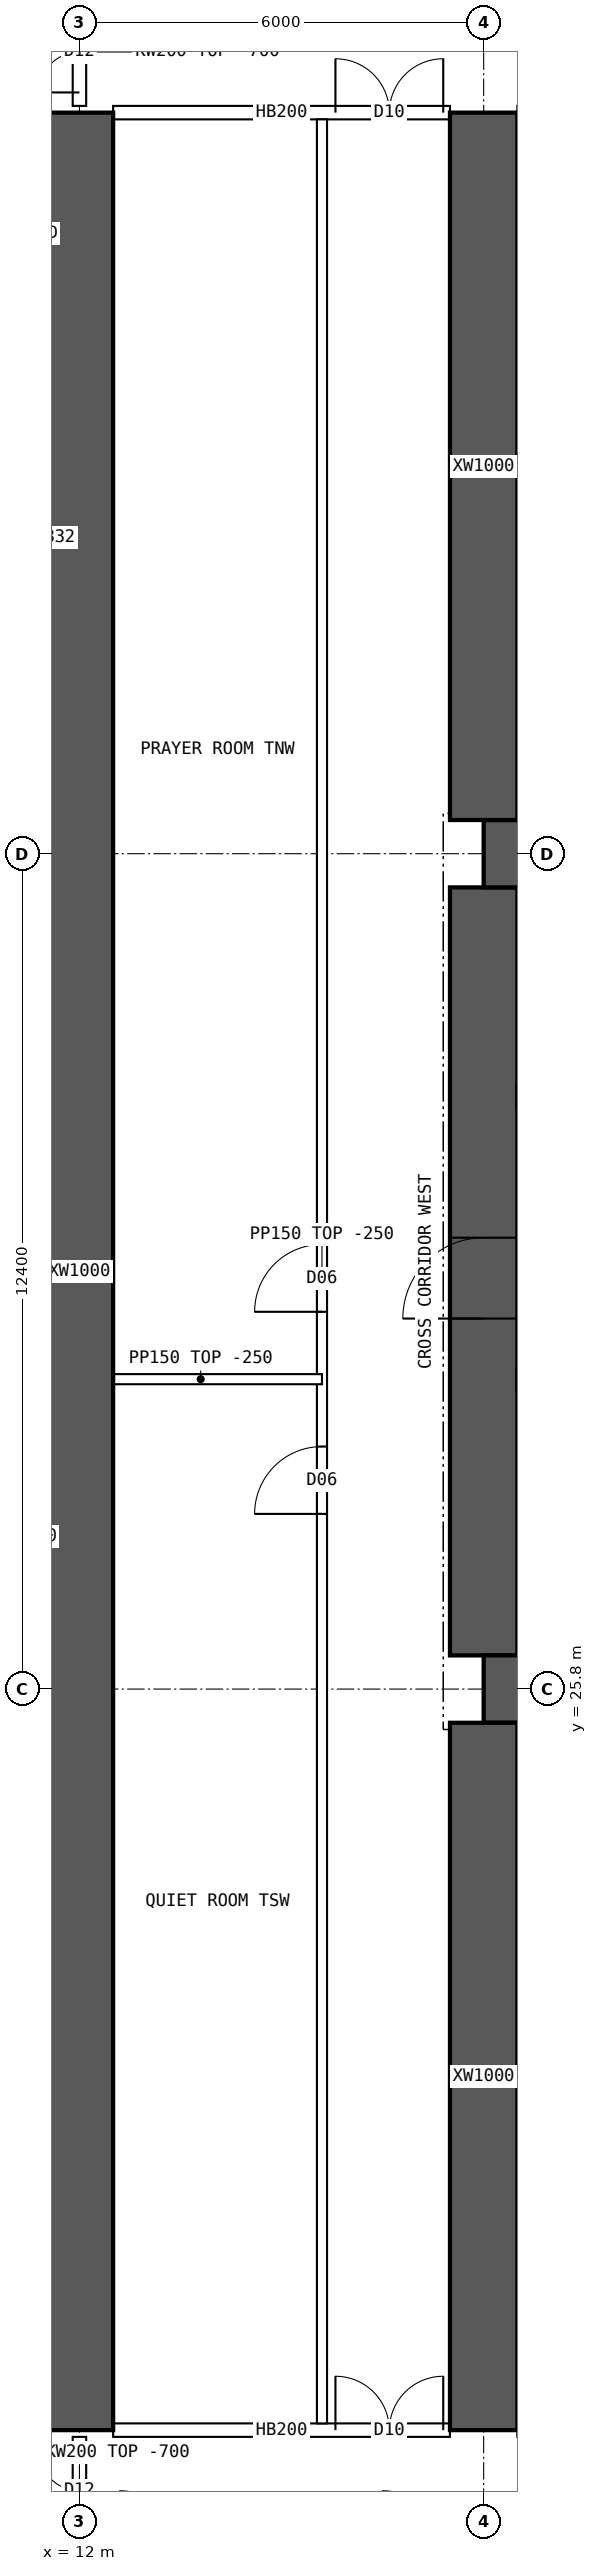
"""IFC4 building model, lengths in metres.
Left out: names, types, materials, properties, quantities, classifications, styles, units other than length and angle.
Written with IfcOpenShell. Run it as: python <this file> out.ifc"""

import sys

from ifc_helpers import new_model, si_unit, direction, frame, frame_2d, origin, place, context, subcontext, project, spatial, polyline, rectangle, outline, extrude, element, fill, save


model = new_model("IFC4")
c1 = context("Model", 3, precision=1e-05, world=origin(), true_north=direction((0.0, 1.0)))
c2 = subcontext(c1, "Body", "Model", "MODEL_VIEW")
j1 = project(units=[si_unit("LENGTHUNIT", "METRE"), si_unit("PLANEANGLEUNIT", "RADIAN")], contexts=[c1])
p1 = place(None, origin())
s1 = spatial("IfcSite", under=j1, at=p1, CompositionType="ELEMENT")
p2 = place(p1, origin())
s2 = spatial("IfcBuilding", under=s1, at=p2, CompositionType="ELEMENT")
p3 = place(p2, frame((0.0, 0.0, 38.95)))
s3 = spatial("IfcBuildingStorey", under=s2, at=p3, CompositionType="ELEMENT", Elevation=38.95)
for number, where, z_axis, x_axis in (
    (1, (18.0, 25.8, 0.0), (0.0, 0.0, 1.0), (1.0, 0.0, 0.0)),
    (2, (18.0, 38.2, 0.0), (0.0, 0.0, 1.0), (1.0, 0.0, 0.0)),
):
    element("IfcWall", number, at=place(p3, frame(where, z_axis=z_axis, x_axis=x_axis)), inside=s3, PredefinedType="SHEAR", context=c2, shape_type="SweptSolid", body=[
        extrude(rectangle(XDim=48.0, YDim=1.0, at=frame_2d((24.0, 0.0))), origin(), (0.0, 0.0, 1.0), 3.75),
    ])
p4 = place(p3, frame((18.0, 26.3, 0.0), z_axis=(0.0, 0.0, 1.0), x_axis=(0.0, 1.0, 0.0)))
e3 = element("IfcWall", 3, at=p4, inside=s3, PredefinedType="SHEAR", context=c2, shape_type="SweptSolid", body=[
    extrude(rectangle(XDim=11.4, YDim=1.0, at=frame_2d((5.7, 0.0))), origin(), (0.0, 0.0, 1.0), 3.75),
])
p5 = place(p4, frame((5.0, 0.0, 0.0)))
e4 = element("IfcOpeningElement", 4, at=p5, cuts=e3, PredefinedType="OPENING", context=c2, shape_type="SweptSolid", body=[
    extrude(rectangle(XDim=1.2, YDim=2.1, at=frame_2d((0.6, 1.05))), frame((0.0, 0.51, 0.0), z_axis=(0.0, -1.0, 0.0), x_axis=(1.0, 0.0, 0.0)), (0.0, 0.0, 1.0), 1.02),
])
p6 = place(p3, frame((12.0, 14.8, 0.0), z_axis=(0.0, 0.0, 1.0), x_axis=(0.0, 1.0, 0.0)))
e5 = element("IfcWall", 5, at=p6, inside=s3, PredefinedType="SHEAR", context=c2, shape_type="SweptSolid", body=[
    extrude(rectangle(XDim=34.4, YDim=1.0, at=frame_2d((17.2, 0.0))), origin(), (0.0, 0.0, 1.0), 3.75),
])
for number, where, z_axis, x_axis in (
    (6, (18.0, 14.8, 0.0), (0.0, 0.0, 1.0), (0.0, 1.0, 0.0)),
    (7, (18.0, 38.7, 0.0), (0.0, 0.0, 1.0), (0.0, 1.0, 0.0)),
):
    element("IfcWall", number, at=place(p3, frame(where, z_axis=z_axis, x_axis=x_axis)), inside=s3, PredefinedType="SHEAR", context=c2, shape_type="SweptSolid", body=[
        extrude(rectangle(XDim=10.5, YDim=1.0, at=frame_2d((5.25, 0.0))), origin(), (0.0, 0.0, 1.0), 3.75),
    ])
p7 = place(p3, frame((12.5, 14.8, 0.0), z_axis=(0.0, 0.0, 1.0), x_axis=(1.0, 0.0, 0.0)))
e8 = element("IfcWall", 8, at=p7, inside=s3, PredefinedType="SOLIDWALL", context=c2, shape_type="SweptSolid", body=[
    extrude(rectangle(XDim=5.0, YDim=0.2, at=frame_2d((2.5, 0.0))), origin(), (0.0, 0.0, 1.0), 3.5),
])
p8 = place(p7, frame((3.3, 0.0, 0.0)))
e9 = element("IfcOpeningElement", 9, at=p8, cuts=e8, PredefinedType="OPENING", context=c2, shape_type="SweptSolid", body=[
    extrude(rectangle(XDim=1.6, YDim=2.1, at=frame_2d((0.8, 1.05))), frame((0.0, 0.11, 0.0), z_axis=(0.0, -1.0, 0.0), x_axis=(1.0, 0.0, 0.0)), (0.0, 0.0, 1.0), 0.22),
])
p9 = place(p3, frame((12.5, 49.2, 0.0), z_axis=(0.0, 0.0, 1.0), x_axis=(1.0, 0.0, 0.0)))
e10 = element("IfcWall", 10, at=p9, inside=s3, PredefinedType="SOLIDWALL", context=c2, shape_type="SweptSolid", body=[
    extrude(rectangle(XDim=5.0, YDim=0.2, at=frame_2d((2.5, 0.0))), origin(), (0.0, 0.0, 1.0), 3.5),
])
p10 = place(p9, frame((3.3, 0.0, 0.0)))
e11 = element("IfcOpeningElement", 11, at=p10, cuts=e10, PredefinedType="OPENING", context=c2, shape_type="SweptSolid", body=[
    extrude(rectangle(XDim=1.6, YDim=2.1, at=frame_2d((0.8, 1.05))), frame((0.0, 0.11, 0.0), z_axis=(0.0, -1.0, 0.0), x_axis=(1.0, 0.0, 0.0)), (0.0, 0.0, 1.0), 0.22),
])
p11 = place(p3, frame((15.6, 14.9, 0.0), z_axis=(0.0, 0.0, 1.0), x_axis=(0.0, 1.0, 0.0)))
e12 = element("IfcWall", 12, at=p11, inside=s3, PredefinedType="PARTITIONING", context=c2, shape_type="SweptSolid", body=[
    extrude(rectangle(XDim=34.2, YDim=0.15, at=frame_2d((17.1, 0.0))), origin(), (0.0, 0.0, 1.0), 3.5),
])
p12 = place(p11, frame((13.5, 0.0, 0.0)))
e13 = element("IfcOpeningElement", 13, at=p12, cuts=e12, PredefinedType="OPENING", context=c2, shape_type="SweptSolid", body=[
    extrude(rectangle(XDim=1.0, YDim=2.1, at=frame_2d((0.5, 1.05))), frame((0.0, 0.085, 0.0), z_axis=(0.0, -1.0, 0.0), x_axis=(1.0, 0.0, 0.0)), (0.0, 0.0, 1.0), 0.17),
])
p13 = place(p11, frame((16.5, 0.0, 0.0)))
e14 = element("IfcOpeningElement", 14, at=p13, cuts=e12, PredefinedType="OPENING", context=c2, shape_type="SweptSolid", body=[
    extrude(rectangle(XDim=1.0, YDim=2.1, at=frame_2d((0.5, 1.05))), frame((0.0, 0.085, 0.0), z_axis=(0.0, -1.0, 0.0), x_axis=(1.0, 0.0, 0.0)), (0.0, 0.0, 1.0), 0.17),
])
p14 = place(p3, frame((12.0, 30.4, 0.0), z_axis=(0.0, 0.0, 1.0), x_axis=(1.0, 0.0, 0.0)))
e15 = element("IfcWall", 15, at=p14, inside=s3, PredefinedType="PARTITIONING", context=c2, shape_type="SweptSolid", body=[
    extrude(rectangle(XDim=3.6, YDim=0.15, at=frame_2d((1.8, 0.0))), origin(), (0.0, 0.0, 1.0), 3.5),
])
p15 = place(p3, frame((3.905, 30.85, 0.0), z_axis=(0.0, 0.0, 1.0), x_axis=(1.0, 0.0, 0.0)))
e16 = element("IfcWall", 16, at=p15, inside=s3, PredefinedType="PARTITIONING", context=c2, shape_type="SweptSolid", body=[
    extrude(outline(polyline([(0.0, 0.0), (8.02, 0.0), (8.02, 3.5), (2.397, 3.5), (2.395, 3.05), (1.797, 3.05), (1.795, 3.5), (0.0, 3.5), (0.0, 0.0)])), frame((0.0, 0.075, 0.0), z_axis=(0.0, -1.0, 0.0), x_axis=(1.0, 0.0, 0.0)), (0.0, 0.0, 1.0), 0.15),
])
p16 = place(p3, frame((12.0, 13.1, 0.0), z_axis=(0.0, 0.0, 1.0), x_axis=(0.0, 1.0, 0.0)))
e17 = element("IfcWall", 17, at=p16, inside=s3, PredefinedType="SOLIDWALL", context=c2, shape_type="SweptSolid", body=[
    extrude(outline(polyline([(0.0, 0.0), (1.6, 0.0), (1.6, 3.05), (0.0, 3.05), (0.0, 0.0)])), frame((0.0, 0.1, 0.0), z_axis=(0.0, -1.0, 0.0), x_axis=(1.0, 0.0, 0.0)), (0.0, 0.0, 1.0), 0.2),
])
p17 = place(p16, frame((0.2, 0.0, 0.0)))
e18 = element("IfcOpeningElement", 18, at=p17, cuts=e17, PredefinedType="OPENING", context=c2, shape_type="SweptSolid", body=[
    extrude(rectangle(XDim=1.2, YDim=2.1, at=frame_2d((0.6, 1.05))), frame((0.0, 0.11, 0.0), z_axis=(0.0, -1.0, 0.0), x_axis=(1.0, 0.0, 0.0)), (0.0, 0.0, 1.0), 0.22),
])
p18 = place(p3, frame((12.0, 49.3, 0.0), z_axis=(0.0, 0.0, 1.0), x_axis=(0.0, 1.0, 0.0)))
e19 = element("IfcWall", 19, at=p18, inside=s3, PredefinedType="SOLIDWALL", context=c2, shape_type="SweptSolid", body=[
    extrude(outline(polyline([(0.0, 0.0), (1.6, 0.0), (1.6, 3.05), (0.0, 3.05), (0.0, 0.0)])), frame((0.0, 0.1, 0.0), z_axis=(0.0, -1.0, 0.0), x_axis=(1.0, 0.0, 0.0)), (0.0, 0.0, 1.0), 0.2),
])
p19 = place(p18, frame((0.2, 0.0, 0.0)))
e20 = element("IfcOpeningElement", 20, at=p19, cuts=e19, PredefinedType="OPENING", context=c2, shape_type="SweptSolid", body=[
    extrude(rectangle(XDim=1.2, YDim=2.1, at=frame_2d((0.6, 1.05))), frame((0.0, 0.11, 0.0), z_axis=(0.0, -1.0, 0.0), x_axis=(1.0, 0.0, 0.0)), (0.0, 0.0, 1.0), 0.22),
])
p20 = place(p5, origin())
e21 = element("IfcDoor", 21, at=p20, inside=s3, OperationType="SINGLE_SWING_LEFT", PredefinedType="DOOR", context=c2, shape_type="SweptSolid", body=[
    extrude(rectangle(XDim=1.2, YDim=2.1, at=frame_2d((0.6, 1.05))), frame((0.0, 0.025, 0.0), z_axis=(0.0, -1.0, 0.0), x_axis=(1.0, 0.0, 0.0)), (0.0, 0.0, 1.0), 0.05),
])
fill(e4, e21)
p21 = place(p8, origin())
e22 = element("IfcDoor", 22, at=p21, inside=s3, OperationType="DOUBLE_DOOR_SINGLE_SWING", PredefinedType="DOOR", context=c2, shape_type="SweptSolid", body=[
    extrude(rectangle(XDim=1.6, YDim=2.1, at=frame_2d((0.8, 1.05))), frame((0.0, 0.025, 0.0), z_axis=(0.0, -1.0, 0.0), x_axis=(1.0, 0.0, 0.0)), (0.0, 0.0, 1.0), 0.05),
])
fill(e9, e22)
p22 = place(p10, origin())
e23 = element("IfcDoor", 23, at=p22, inside=s3, OperationType="DOUBLE_DOOR_SINGLE_SWING", PredefinedType="DOOR", context=c2, shape_type="SweptSolid", body=[
    extrude(rectangle(XDim=1.6, YDim=2.1, at=frame_2d((0.8, 1.05))), frame((0.0, 0.025, 0.0), z_axis=(0.0, -1.0, 0.0), x_axis=(1.0, 0.0, 0.0)), (0.0, 0.0, 1.0), 0.05),
])
fill(e11, e23)
p23 = place(p12, origin())
e24 = element("IfcDoor", 24, at=p23, inside=s3, OperationType="SINGLE_SWING_LEFT", PredefinedType="DOOR", context=c2, shape_type="SweptSolid", body=[
    extrude(rectangle(XDim=1.0, YDim=2.1, at=frame_2d((0.5, 1.05))), frame((0.0, 0.025, 0.0), z_axis=(0.0, -1.0, 0.0), x_axis=(1.0, 0.0, 0.0)), (0.0, 0.0, 1.0), 0.05),
])
fill(e13, e24)
p24 = place(p13, origin())
e25 = element("IfcDoor", 25, at=p24, inside=s3, OperationType="SINGLE_SWING_LEFT", PredefinedType="DOOR", context=c2, shape_type="SweptSolid", body=[
    extrude(rectangle(XDim=1.0, YDim=2.1, at=frame_2d((0.5, 1.05))), frame((0.0, 0.025, 0.0), z_axis=(0.0, -1.0, 0.0), x_axis=(1.0, 0.0, 0.0)), (0.0, 0.0, 1.0), 0.05),
])
fill(e14, e25)
p25 = place(p17, origin())
e26 = element("IfcDoor", 26, at=p25, inside=s3, OperationType="DOUBLE_DOOR_SINGLE_SWING", PredefinedType="DOOR", context=c2, shape_type="SweptSolid", body=[
    extrude(rectangle(XDim=1.2, YDim=2.1, at=frame_2d((0.6, 1.05))), frame((0.0, 0.025, 0.0), z_axis=(0.0, -1.0, 0.0), x_axis=(1.0, 0.0, 0.0)), (0.0, 0.0, 1.0), 0.05),
])
fill(e18, e26)
p26 = place(p19, origin())
e27 = element("IfcDoor", 27, at=p26, inside=s3, OperationType="DOUBLE_DOOR_SINGLE_SWING", PredefinedType="DOOR", context=c2, shape_type="SweptSolid", body=[
    extrude(rectangle(XDim=1.2, YDim=2.1, at=frame_2d((0.6, 1.05))), frame((0.0, 0.025, 0.0), z_axis=(0.0, -1.0, 0.0), x_axis=(1.0, 0.0, 0.0)), (0.0, 0.0, 1.0), 0.05),
])
fill(e20, e27)
save(model, sys.argv[1])
